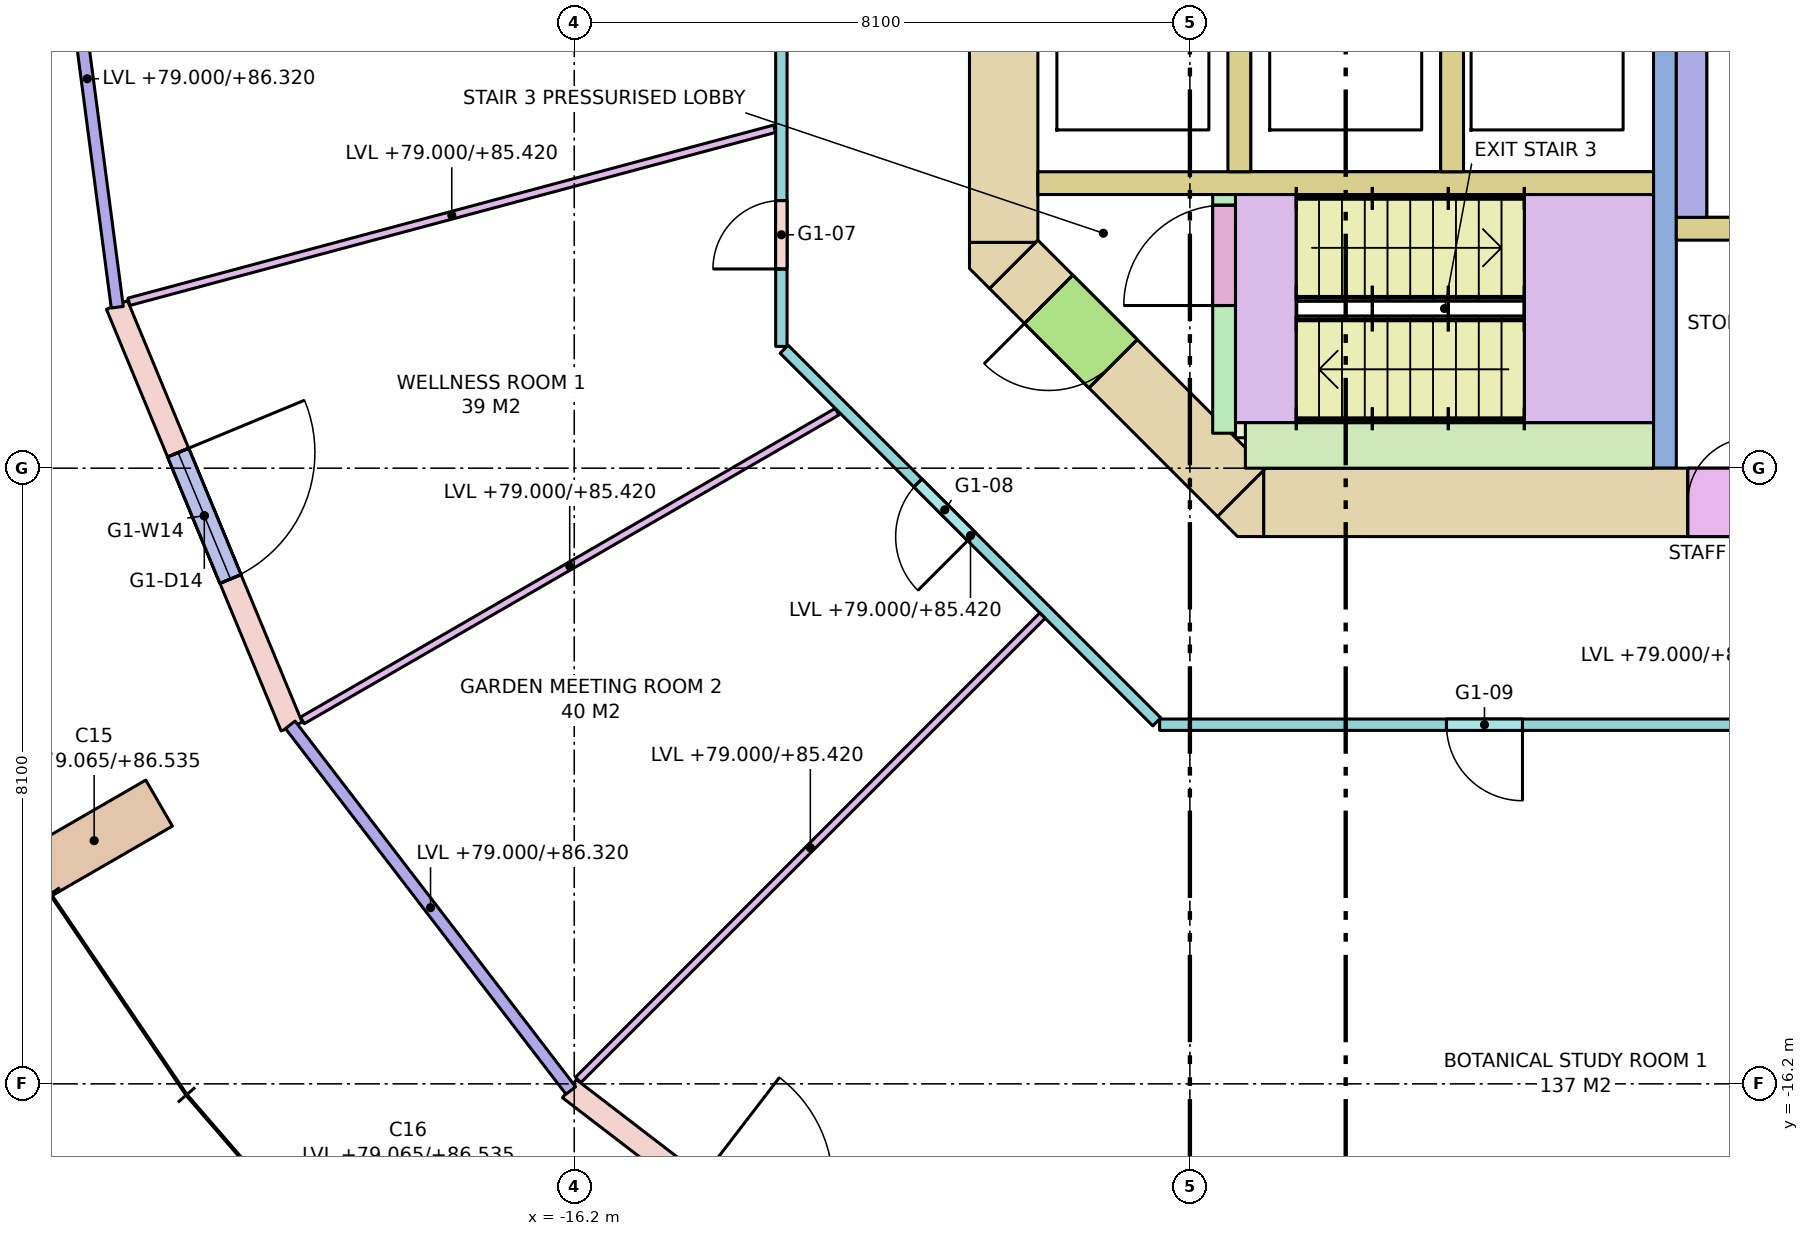
"""IFC4 building model, lengths in metres.
Left out: names, types, materials, properties, quantities, classifications, styles, units other than length and angle.
Written with IfcOpenShell. Run it as: python <this file> out.ifc"""

import sys

from ifc_helpers import new_model, si_unit, direction, frame, frame_2d, origin, origin_2d, place, context, subcontext, project, spatial, polyline, rectangle, outline, extrude, element, fill, save


model = new_model("IFC4")
c1 = context("Model", 3, precision=1e-05, world=origin(), true_north=direction((0.0, 1.0)))
c2 = subcontext(c1, "Body", "Model", "MODEL_VIEW")
j1 = project(units=[si_unit("LENGTHUNIT", "METRE"), si_unit("PLANEANGLEUNIT", "RADIAN")], contexts=[c1])
p1 = place(None, origin())
s1 = spatial("IfcSite", under=j1, at=p1, CompositionType="ELEMENT")
p2 = place(p1, origin())
s2 = spatial("IfcBuilding", under=s1, at=p2, CompositionType="ELEMENT")
p3 = place(p2, frame((0.0, 0.0, 79.0)))
s3 = spatial("IfcBuildingStorey", under=s2, at=p3, CompositionType="ELEMENT", Elevation=79.0)
p4 = place(p3, frame((-22.942, -13.246, 0.065), z_axis=(0.112966818214, 0.065200584695, 0.991457201163), x_axis=(-0.499880173341, 0.866094574686, 0.0)))
e1 = element("IfcColumn", 1, at=p4, inside=s3, PredefinedType="COLUMN", context=c2, shape_type="SweptSolid", body=[
    extrude(rectangle(XDim=0.7, YDim=1.0, at=origin_2d()), origin(), (0.0, 0.0, 1.0), 7.534),
])
p5 = place(p3, frame((-7.13, -8.55, -0.28), z_axis=(0.0, 0.0, 1.0), x_axis=(1.0, 0.0, 0.0)))
e2 = element("IfcWall", 2, at=p5, inside=s3, PredefinedType="SHEAR", context=c2, shape_type="SweptSolid", body=[
    extrude(rectangle(XDim=14.26, YDim=0.9, at=frame_2d((7.13, 0.0))), origin(), (0.0, 0.0, 1.0), 7.6),
])
p6 = place(p5, frame((8.08, 0.0, 0.28)))
e3 = element("IfcOpeningElement", 3, at=p6, cuts=e2, PredefinedType="OPENING", context=c2, shape_type="SweptSolid", body=[
    extrude(rectangle(XDim=0.7, YDim=2.1, at=frame_2d((0.35, 1.05))), frame((0.0, 0.46, 0.0), z_axis=(0.0, -1.0, 0.0), x_axis=(1.0, 0.0, 0.0)), (0.0, 0.0, 1.0), 0.92),
])
p7 = place(p5, frame((5.58, 0.0, 0.28)))
e4 = element("IfcOpeningElement", 4, at=p7, cuts=e2, PredefinedType="OPENING", context=c2, shape_type="SweptSolid", body=[
    extrude(rectangle(XDim=0.85, YDim=2.1, at=frame_2d((0.425, 1.05))), frame((0.0, 0.46, 0.0), z_axis=(0.0, -1.0, 0.0), x_axis=(1.0, 0.0, 0.0)), (0.0, 0.0, 1.0), 0.92),
])
p8 = place(p5, frame((6.88, 0.0, 0.28)))
e5 = element("IfcOpeningElement", 5, at=p8, cuts=e2, PredefinedType="OPENING", context=c2, shape_type="SweptSolid", body=[
    extrude(rectangle(XDim=0.85, YDim=2.1, at=frame_2d((0.425, 1.05))), frame((0.0, 0.46, 0.0), z_axis=(0.0, -1.0, 0.0), x_axis=(1.0, 0.0, 0.0)), (0.0, 0.0, 1.0), 0.92),
])
p9 = place(p5, frame((9.521, 0.0, 0.28)))
e6 = element("IfcOpeningElement", 6, at=p9, cuts=e2, PredefinedType="OPENING", context=c2, shape_type="SweptSolid", body=[
    extrude(rectangle(XDim=0.9, YDim=2.1, at=frame_2d((0.45, 1.05))), frame((0.0, 0.46, 0.0), z_axis=(0.0, -1.0, 0.0), x_axis=(1.0, 0.0, 0.0)), (0.0, 0.0, 1.0), 0.92),
])
p10 = place(p5, frame((11.278, 0.0, 0.28)))
e7 = element("IfcOpeningElement", 7, at=p10, cuts=e2, PredefinedType="OPENING", context=c2, shape_type="SweptSolid", body=[
    extrude(rectangle(XDim=0.9, YDim=2.1, at=frame_2d((0.45, 1.05))), frame((0.0, 0.46, 0.0), z_axis=(0.0, -1.0, 0.0), x_axis=(1.0, 0.0, 0.0)), (0.0, 0.0, 1.0), 0.92),
])
p11 = place(p5, frame((12.84, 0.0, 0.28)))
e8 = element("IfcOpeningElement", 8, at=p11, cuts=e2, PredefinedType="OPENING", context=c2, shape_type="SweptSolid", body=[
    extrude(rectangle(XDim=0.9, YDim=2.1, at=frame_2d((0.45, 1.05))), frame((0.0, 0.46, 0.0), z_axis=(0.0, -1.0, 0.0), x_axis=(1.0, 0.0, 0.0)), (0.0, 0.0, 1.0), 0.92),
])
p12 = place(p3, frame((-10.55, -5.13, -0.28), z_axis=(0.0, 0.0, 1.0), x_axis=(0.0, 1.0, 0.0)))
e9 = element("IfcWall", 9, at=p12, inside=s3, PredefinedType="SHEAR", context=c2, shape_type="SweptSolid", body=[
    extrude(rectangle(XDim=10.26, YDim=0.9, at=frame_2d((5.13, 0.0))), origin(), (0.0, 0.0, 1.0), 7.6),
])
p13 = place(p12, frame((4.13, 0.0, 0.28)))
e10 = element("IfcOpeningElement", 10, at=p13, cuts=e9, PredefinedType="OPENING", context=c2, shape_type="SweptSolid", body=[
    extrude(rectangle(XDim=2.0, YDim=2.1, at=frame_2d((1.0, 1.05))), frame((0.0, 0.46, 0.0), z_axis=(0.0, -1.0, 0.0), x_axis=(1.0, 0.0, 0.0)), (0.0, 0.0, 1.0), 0.92),
])
p14 = place(p3, frame((-7.418, -8.418, -0.28), z_axis=(0.0, 0.0, 1.0), x_axis=(-0.707106781187, 0.707106781187, 0.0)))
e11 = element("IfcWall", 11, at=p14, inside=s3, PredefinedType="SHEAR", context=c2, shape_type="SweptSolid", body=[
    extrude(rectangle(XDim=4.243, YDim=0.9, at=frame_2d((2.121, 0.0))), origin(), (0.0, 0.0, 1.0), 7.6),
])
p15 = place(p14, frame((2.393, 0.0, 0.28)))
e12 = element("IfcOpeningElement", 12, at=p15, cuts=e11, PredefinedType="OPENING", context=c2, shape_type="SweptSolid", body=[
    extrude(rectangle(XDim=1.2, YDim=2.1, at=frame_2d((0.6, 1.05))), frame((0.0, 0.46, 0.0), z_axis=(0.0, -1.0, 0.0), x_axis=(1.0, 0.0, 0.0)), (0.0, 0.0, 1.0), 0.92),
])
p16 = place(p3, frame((0.0, 0.0, -0.28)))
e13 = element("IfcWall", 13, at=p16, inside=s3, PredefinedType="SHEAR", context=c2, shape_type="SweptSolid", body=[
    extrude(outline(polyline([(-7.473, -9.0), (-7.736, -8.736), (-7.13, -8.13), (-7.13, -9.0), (-7.473, -9.0)])), origin(), (0.0, 0.0, 1.0), 7.6),
])
p17 = place(p3, frame((0.0, 0.0, -0.28)))
e14 = element("IfcWall", 14, at=p17, inside=s3, PredefinedType="SHEAR", context=c2, shape_type="SweptSolid", body=[
    extrude(outline(polyline([(-11.0, -5.473), (-11.0, -5.13), (-10.13, -5.13), (-10.736, -5.736), (-11.0, -5.473)])), origin(), (0.0, 0.0, 1.0), 7.6),
])
p18 = place(p3, frame((-10.1, -4.35, 0.0), z_axis=(0.0, 0.0, 1.0), x_axis=(1.0, 0.0, 0.0)))
e15 = element("IfcWall", 15, at=p18, inside=s3, PredefinedType="SOLIDWALL", context=c2, shape_type="SweptSolid", body=[
    extrude(rectangle(XDim=8.1, YDim=0.3, at=frame_2d((4.05, 0.0))), origin(), (0.0, 0.0, 1.0), 7.32),
])
for number, where, z_axis, x_axis in (
    (16, (-7.45, -4.2, 0.0), (0.0, 0.0, 1.0), (0.0, 1.0, 0.0)),
    (17, (-4.65, -4.2, 0.0), (0.0, 0.0, 1.0), (0.0, 1.0, 0.0)),
):
    element("IfcWall", number, at=place(p3, frame(where, z_axis=z_axis, x_axis=x_axis)), inside=s3, PredefinedType="SOLIDWALL", context=c2, shape_type="SweptSolid", body=[
        extrude(rectangle(XDim=2.4, YDim=0.3, at=frame_2d((1.2, 0.0))), origin(), (0.0, 0.0, 1.0), 7.32),
    ])
p19 = place(p3, frame((-1.85, -8.1, 0.0), z_axis=(0.0, 0.0, 1.0), x_axis=(0.0, 1.0, 0.0)))
e18 = element("IfcWall", 18, at=p19, inside=s3, PredefinedType="SHEAR", context=c2, shape_type="SweptSolid", body=[
    extrude(rectangle(XDim=6.6, YDim=0.3, at=frame_2d((3.3, 0.0))), origin(), (0.0, 0.0, 1.0), 7.32),
])
p20 = place(p3, frame((-1.5, -4.8, 0.0), z_axis=(0.0, 0.0, 1.0), x_axis=(0.0, 1.0, 0.0)))
e19 = element("IfcWall", 19, at=p20, inside=s3, PredefinedType="SOLIDWALL", context=c2, shape_type="SweptSolid", body=[
    extrude(rectangle(XDim=3.0, YDim=0.4, at=frame_2d((1.5, 0.0))), origin(), (0.0, 0.0, 1.0), 7.32),
])
p21 = place(p3, frame((-1.7, -4.95, 0.0), z_axis=(0.0, 0.0, 1.0), x_axis=(1.0, 0.0, 0.0)))
e20 = element("IfcWall", 20, at=p21, inside=s3, PredefinedType="SOLIDWALL", context=c2, shape_type="SweptSolid", body=[
    extrude(rectangle(XDim=3.4, YDim=0.3, at=frame_2d((1.7, 0.0))), origin(), (0.0, 0.0, 1.0), 7.32),
])
p22 = place(p3, frame((-7.65, -7.64, 0.0), z_axis=(0.0, 0.0, 1.0), x_axis=(0.0, 1.0, 0.0)))
e21 = element("IfcWall", 21, at=p22, inside=s3, PredefinedType="SHEAR", context=c2, shape_type="SweptSolid", body=[
    extrude(rectangle(XDim=3.14, YDim=0.3, at=frame_2d((1.57, 0.0))), origin(), (0.0, 0.0, 1.0), 7.32),
])
p23 = place(p22, frame((1.68, 0.0, 0.0)))
e22 = element("IfcOpeningElement", 22, at=p23, cuts=e21, PredefinedType="OPENING", context=c2, shape_type="SweptSolid", body=[
    extrude(rectangle(XDim=1.32, YDim=2.1, at=frame_2d((0.66, 1.05))), frame((0.0, 0.16, 0.0), z_axis=(0.0, -1.0, 0.0), x_axis=(1.0, 0.0, 0.0)), (0.0, 0.0, 1.0), 0.32),
])
p24 = place(p3, frame((-7.5, -7.6, 0.0), z_axis=(0.0, 0.0, 1.0), x_axis=(1.0, 0.0, 0.0)))
e23 = element("IfcWall", 23, at=p24, inside=s3, PredefinedType="SHEAR", context=c2, shape_type="SweptSolid", body=[
    extrude(rectangle(XDim=0.6, YDim=0.2, at=frame_2d((0.3, 0.0))), origin(), (0.0, 0.0, 1.0), 7.32),
])
p25 = place(p3, frame((-7.37, -7.8, 0.0), z_axis=(0.0, 0.0, 1.0), x_axis=(1.0, 0.0, 0.0)))
e24 = element("IfcWall", 24, at=p25, inside=s3, PredefinedType="SHEAR", context=c2, shape_type="SweptSolid", body=[
    extrude(rectangle(XDim=5.37, YDim=0.6, at=frame_2d((2.685, 0.0))), origin(), (0.0, 0.0, 1.0), 7.32),
])
p26 = place(p3, frame((-22.216, -5.953, 0.0), z_axis=(0.0, 0.0, 1.0), x_axis=(0.382671411433, -0.923884511653, 0.0)))
e25 = element("IfcWall", 25, at=p26, inside=s3, PredefinedType="STANDARD", context=c2, shape_type="SweptSolid", body=[
    extrude(rectangle(XDim=6.004, YDim=0.3, at=frame_2d((3.002, 0.0))), origin(), (0.0, 0.0, 1.0), 7.32),
])
p27 = place(p26, frame((2.102, 0.0, 0.0)))
e26 = element("IfcOpeningElement", 26, at=p27, cuts=e25, PredefinedType="OPENING", context=c2, shape_type="SweptSolid", body=[
    extrude(rectangle(XDim=1.8, YDim=2.4, at=frame_2d((0.9, 1.2))), frame((0.0, 0.16, 0.0), z_axis=(0.0, -1.0, 0.0), x_axis=(1.0, 0.0, 0.0)), (0.0, 0.0, 1.0), 0.32),
])
p28 = place(p26, frame((2.102, 0.0, 2.8)))
e27 = element("IfcOpeningElement", 27, at=p28, cuts=e25, PredefinedType="OPENING", context=c2, shape_type="SweptSolid", body=[
    extrude(rectangle(XDim=1.8, YDim=4.3, at=frame_2d((0.9, 2.15))), frame((0.0, 0.16, 0.0), z_axis=(0.0, -1.0, 0.0), x_axis=(1.0, 0.0, 0.0)), (0.0, 0.0, 1.0), 0.32),
])
p29 = place(p3, frame((-16.263, -16.263, 0.0), z_axis=(0.0, 0.0, 1.0), x_axis=(0.793339924758, -0.608778912074, 0.0)))
e28 = element("IfcWall", 28, at=p29, inside=s3, PredefinedType="STANDARD", context=c2, shape_type="SweptSolid", body=[
    extrude(rectangle(XDim=6.004, YDim=0.3, at=frame_2d((3.002, 0.0))), origin(), (0.0, 0.0, 1.0), 7.32),
])
p30 = place(p29, frame((2.102, 0.0, 0.0)))
e29 = element("IfcOpeningElement", 29, at=p30, cuts=e28, PredefinedType="OPENING", context=c2, shape_type="SweptSolid", body=[
    extrude(rectangle(XDim=1.8, YDim=2.4, at=frame_2d((0.9, 1.2))), frame((0.0, 0.16, 0.0), z_axis=(0.0, -1.0, 0.0), x_axis=(1.0, 0.0, 0.0)), (0.0, 0.0, 1.0), 0.32),
])
p31 = place(p29, frame((2.102, 0.0, 2.8)))
e30 = element("IfcOpeningElement", 30, at=p31, cuts=e28, PredefinedType="OPENING", context=c2, shape_type="SweptSolid", body=[
    extrude(rectangle(XDim=1.8, YDim=4.3, at=frame_2d((0.9, 2.15))), frame((0.0, 0.16, 0.0), z_axis=(0.0, -1.0, 0.0), x_axis=(1.0, 0.0, 0.0)), (0.0, 0.0, 1.0), 0.32),
])
p32 = place(p3, frame((8.498, -11.475, 0.0), z_axis=(0.0, 0.0, 1.0), x_axis=(-1.0, 0.0, 0.0)))
e31 = element("IfcWall", 31, at=p32, inside=s3, PredefinedType="PARTITIONING", context=c2, shape_type="SweptSolid", body=[
    extrude(rectangle(XDim=16.996, YDim=0.15, at=frame_2d((8.498, 0.0))), origin(), (0.0, 0.0, 1.0), 6.42),
])
p33 = place(p32, frame((12.222, 0.0, 0.0)))
e32 = element("IfcOpeningElement", 32, at=p33, cuts=e31, PredefinedType="OPENING", context=c2, shape_type="SweptSolid", body=[
    extrude(rectangle(XDim=1.0, YDim=2.1, at=frame_2d((0.5, 1.05))), frame((0.0, 0.085, 0.0), z_axis=(0.0, -1.0, 0.0), x_axis=(1.0, 0.0, 0.0)), (0.0, 0.0, 1.0), 0.17),
])
p34 = place(p32, frame((6.51, 0.0, 0.0)))
e33 = element("IfcOpeningElement", 33, at=p34, cuts=e31, PredefinedType="OPENING", context=c2, shape_type="SweptSolid", body=[
    extrude(rectangle(XDim=0.9, YDim=2.1, at=frame_2d((0.45, 1.05))), frame((0.0, 0.085, 0.0), z_axis=(0.0, -1.0, 0.0), x_axis=(1.0, 0.0, 0.0)), (0.0, 0.0, 1.0), 0.17),
])
p35 = place(p3, frame((-8.535, -11.438, 0.0), z_axis=(0.0, 0.0, 1.0), x_axis=(-0.707106781187, 0.707106781187, 0.0)))
e34 = element("IfcWall", 34, at=p35, inside=s3, PredefinedType="PARTITIONING", context=c2, shape_type="SweptSolid", body=[
    extrude(rectangle(XDim=6.934, YDim=0.15, at=frame_2d((3.467, 0.0))), origin(), (0.0, 0.0, 1.0), 6.42),
])
p36 = place(p35, frame((3.446, 0.0, 0.0)))
e35 = element("IfcOpeningElement", 35, at=p36, cuts=e34, PredefinedType="OPENING", context=c2, shape_type="SweptSolid", body=[
    extrude(rectangle(XDim=1.0, YDim=2.1, at=frame_2d((0.5, 1.05))), frame((0.0, 0.085, 0.0), z_axis=(0.0, -1.0, 0.0), x_axis=(1.0, 0.0, 0.0)), (0.0, 0.0, 1.0), 0.17),
])
p37 = place(p3, frame((-13.475, -6.498, 0.0), z_axis=(0.0, 0.0, 1.0), x_axis=(0.0, 1.0, 0.0)))
e36 = element("IfcWall", 36, at=p37, inside=s3, PredefinedType="PARTITIONING", context=c2, shape_type="SweptSolid", body=[
    extrude(rectangle(XDim=12.996, YDim=0.15, at=frame_2d((6.498, 0.0))), origin(), (0.0, 0.0, 1.0), 6.42),
])
p38 = place(p37, frame((5.998, 0.0, 0.0)))
e37 = element("IfcOpeningElement", 37, at=p38, cuts=e36, PredefinedType="OPENING", context=c2, shape_type="SweptSolid", body=[
    extrude(rectangle(XDim=1.0, YDim=2.1, at=frame_2d((0.5, 1.05))), frame((0.0, 0.085, 0.0), z_axis=(0.0, -1.0, 0.0), x_axis=(1.0, 0.0, 0.0)), (0.0, 0.0, 1.0), 0.17),
])
p39 = place(p37, frame((1.019, 0.0, 0.0)))
e38 = element("IfcOpeningElement", 38, at=p39, cuts=e36, PredefinedType="OPENING", context=c2, shape_type="SweptSolid", body=[
    extrude(rectangle(XDim=0.9, YDim=2.1, at=frame_2d((0.45, 1.05))), frame((0.0, 0.085, 0.0), z_axis=(0.0, -1.0, 0.0), x_axis=(1.0, 0.0, 0.0)), (0.0, 0.0, 1.0), 0.17),
])
p40 = place(p3, frame((-13.564, -3.635, 0.0), z_axis=(0.0, 0.0, 1.0), x_axis=(-0.965924134536, -0.25882535873, 0.0)))
e39 = element("IfcWall", 39, at=p40, inside=s3, PredefinedType="PARTITIONING", context=c2, shape_type="SweptSolid", body=[
    extrude(rectangle(XDim=8.794, YDim=0.1, at=frame_2d((4.397, 0.0))), origin(), (0.0, 0.0, 1.0), 6.42),
])
p41 = place(p3, frame((-12.742, -7.357, 0.0), z_axis=(0.0, 0.0, 1.0), x_axis=(-0.866022418986, -0.500005169787, 0.0)))
e40 = element("IfcWall", 40, at=p41, inside=s3, PredefinedType="PARTITIONING", context=c2, shape_type="SweptSolid", body=[
    extrude(rectangle(XDim=8.123, YDim=0.1, at=frame_2d((4.062, 0.0))), origin(), (0.0, 0.0, 1.0), 6.42),
])
p42 = place(p3, frame((-10.04, -10.04, 0.0), z_axis=(0.0, 0.0, 1.0), x_axis=(-0.707106781187, -0.707106781187, 0.0)))
e41 = element("IfcWall", 41, at=p42, inside=s3, PredefinedType="PARTITIONING", context=c2, shape_type="SweptSolid", body=[
    extrude(rectangle(XDim=8.639, YDim=0.1, at=frame_2d((4.319, 0.0))), origin(), (0.0, 0.0, 1.0), 6.42),
])
p43 = place(p27, origin())
e42 = element("IfcDoor", 42, at=p43, inside=s3, OperationType="SINGLE_SWING_LEFT", PredefinedType="DOOR", context=c2, shape_type="SweptSolid", body=[
    extrude(rectangle(XDim=1.8, YDim=2.4, at=frame_2d((0.9, 1.2))), frame((0.0, 0.025, 0.0), z_axis=(0.0, -1.0, 0.0), x_axis=(1.0, 0.0, 0.0)), (0.0, 0.0, 1.0), 0.05),
])
fill(e26, e42)
p44 = place(p28, origin())
e43 = element("IfcWindow", 43, at=p44, inside=s3, PartitioningType="SINGLE_PANEL", PredefinedType="WINDOW", context=c2, shape_type="SweptSolid", body=[
    extrude(rectangle(XDim=1.8, YDim=4.3, at=frame_2d((0.9, 2.15))), frame((0.0, 0.03, 0.0), z_axis=(0.0, -1.0, 0.0), x_axis=(1.0, 0.0, 0.0)), (0.0, 0.0, 1.0), 0.06),
])
fill(e27, e43)
p45 = place(p23, origin())
e44 = element("IfcDoor", 44, at=p45, inside=s3, OperationType="DOUBLE_DOOR_SINGLE_SWING", PredefinedType="DOOR", context=c2, shape_type="SweptSolid", body=[
    extrude(rectangle(XDim=1.32, YDim=2.1, at=frame_2d((0.66, 1.05))), frame((0.0, 0.025, 0.0), z_axis=(0.0, -1.0, 0.0), x_axis=(1.0, 0.0, 0.0)), (0.0, 0.0, 1.0), 0.05),
])
fill(e22, e44)
p46 = place(p15, origin())
e45 = element("IfcDoor", 45, at=p46, inside=s3, OperationType="SINGLE_SWING_RIGHT", PredefinedType="DOOR", context=c2, shape_type="SweptSolid", body=[
    extrude(rectangle(XDim=1.2, YDim=2.1, at=frame_2d((0.6, 1.05))), frame((0.0, 0.025, 0.0), z_axis=(0.0, -1.0, 0.0), x_axis=(1.0, 0.0, 0.0)), (0.0, 0.0, 1.0), 0.05),
])
fill(e12, e45)
p47 = place(p7, origin())
e46 = element("IfcDoor", 46, at=p47, inside=s3, OperationType="SINGLE_SWING_RIGHT", PredefinedType="DOOR", context=c2, shape_type="SweptSolid", body=[
    extrude(rectangle(XDim=0.85, YDim=2.1, at=frame_2d((0.425, 1.05))), frame((0.0, 0.025, 0.0), z_axis=(0.0, -1.0, 0.0), x_axis=(1.0, 0.0, 0.0)), (0.0, 0.0, 1.0), 0.05),
])
fill(e4, e46)
p48 = place(p39, origin())
e47 = element("IfcDoor", 47, at=p48, inside=s3, OperationType="SINGLE_SWING_LEFT", PredefinedType="DOOR", context=c2, shape_type="SweptSolid", body=[
    extrude(rectangle(XDim=0.9, YDim=2.1, at=frame_2d((0.45, 1.05))), frame((0.0, 0.025, 0.0), z_axis=(0.0, -1.0, 0.0), x_axis=(1.0, 0.0, 0.0)), (0.0, 0.0, 1.0), 0.05),
])
fill(e38, e47)
p49 = place(p36, origin())
e48 = element("IfcDoor", 48, at=p49, inside=s3, OperationType="SINGLE_SWING_LEFT", PredefinedType="DOOR", context=c2, shape_type="SweptSolid", body=[
    extrude(rectangle(XDim=1.0, YDim=2.1, at=frame_2d((0.5, 1.05))), frame((0.0, 0.025, 0.0), z_axis=(0.0, -1.0, 0.0), x_axis=(1.0, 0.0, 0.0)), (0.0, 0.0, 1.0), 0.05),
])
fill(e35, e48)
p50 = place(p33, origin())
e49 = element("IfcDoor", 49, at=p50, inside=s3, OperationType="SINGLE_SWING_LEFT", PredefinedType="DOOR", context=c2, shape_type="SweptSolid", body=[
    extrude(rectangle(XDim=1.0, YDim=2.1, at=frame_2d((0.5, 1.05))), frame((0.0, 0.025, 0.0), z_axis=(0.0, -1.0, 0.0), x_axis=(1.0, 0.0, 0.0)), (0.0, 0.0, 1.0), 0.05),
])
fill(e32, e49)
save(model, sys.argv[1])
